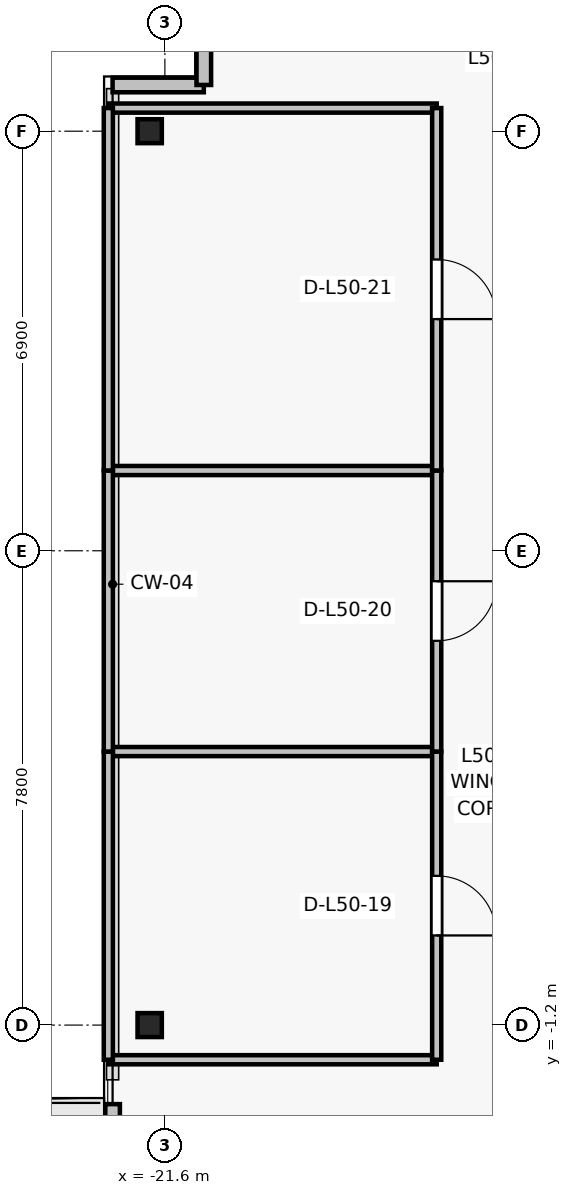
"""IFC4 building model, lengths in metres.
Left out: names, types, materials, properties, quantities, classifications, styles, units other than length and angle.
Written with IfcOpenShell. Run it as: python <this file> out.ifc"""

import sys

from ifc_helpers import new_model, si_unit, direction, frame, frame_2d, origin, origin_2d, place, context, subcontext, project, spatial, rectangle, i_section, extrude, source, transform, mapped, element, fill, save


model = new_model("IFC4")
c1 = context("Model", 3, precision=1e-05, world=origin(), true_north=direction((0.0, 1.0)))
c2 = subcontext(c1, "Body", "Model", "MODEL_VIEW")
j1 = project(units=[si_unit("LENGTHUNIT", "METRE"), si_unit("PLANEANGLEUNIT", "RADIAN")], contexts=[c1])
p1 = place(None, origin())
s1 = spatial("IfcSite", under=j1, at=p1, CompositionType="ELEMENT")
p2 = place(p1, origin())
s2 = spatial("IfcBuilding", under=s1, at=p2, CompositionType="ELEMENT")
p3 = place(p2, frame((0.0, 0.0, 179.2)))
s3 = spatial("IfcBuildingStorey", under=s2, at=p3, CompositionType="ELEMENT", Elevation=179.2)
for number, where, z_axis, x_axis in (
    (1, (-21.85, -1.2, 0.0), (0.0, 0.0, 1.0), (1.0, 0.0, 0.0)),
    (2, (-21.85, 13.5, 0.0), (0.0, 0.0, 1.0), (1.0, 0.0, 0.0)),
):
    element("IfcColumn", number, at=place(p3, frame(where, z_axis=z_axis, x_axis=x_axis)), inside=s3, PredefinedType="COLUMN", context=c2, shape_type="SweptSolid", body=[
        extrude(i_section(OverallWidth=0.399, OverallDepth=0.394, WebThickness=0.023, FlangeThickness=0.037, FilletRadius=0.015, at=origin_2d()), origin(), (0.0, 0.0, 1.0), 3.3),
    ])
p4 = place(p3, frame((-22.46, -8.3, 0.0), z_axis=(0.0, 0.0, 1.0), x_axis=(0.0, 1.0, 0.0)))
e3 = element("IfcWall", 3, at=p4, inside=s3, PredefinedType="SOLIDWALL", context=c2, shape_type="SweptSolid", body=[
    extrude(rectangle(XDim=5.8, YDim=0.24, at=frame_2d((2.9, 0.0))), origin(), (0.0, 0.0, 1.0), 3.075),
])
p5 = place(p4, frame((0.696, 0.0, 0.0)))
e4 = element("IfcOpeningElement", 4, at=p5, cuts=e3, PredefinedType="OPENING", context=c2, shape_type="SweptSolid", body=[
    extrude(rectangle(XDim=1.0, YDim=2.2, at=frame_2d((0.5, 1.1))), frame((0.0, 0.13, 0.0), z_axis=(0.0, -1.0, 0.0), x_axis=(1.0, 0.0, 0.0)), (0.0, 0.0, 1.0), 0.26),
])
p6 = place(p4, frame((2.046, 0.0, 0.85)))
e5 = element("IfcOpeningElement", 5, at=p6, cuts=e3, PredefinedType="OPENING", context=c2, shape_type="SweptSolid", body=[
    extrude(rectangle(XDim=0.9, YDim=1.35, at=frame_2d((0.45, 0.675))), frame((0.0, 0.13, 0.0), z_axis=(0.0, -1.0, 0.0), x_axis=(1.0, 0.0, 0.0)), (0.0, 0.0, 1.0), 0.26),
])
for number, where, z_axis, x_axis in (
    (6, (-20.96, 14.26, 0.0), (0.0, 0.0, 1.0), (-1.0, 0.0, 0.0)),
    (7, (-20.96, 15.76, 0.0), (0.0, 0.0, 1.0), (0.0, -1.0, 0.0)),
):
    element("IfcWall", number, at=place(p3, frame(where, z_axis=z_axis, x_axis=x_axis)), inside=s3, PredefinedType="SOLIDWALL", context=c2, shape_type="SweptSolid", body=[
        extrude(rectangle(XDim=1.5, YDim=0.24, at=frame_2d((0.75, 0.0))), origin(), (0.0, 0.0, 1.0), 3.075),
    ])
for number, where, z_axis, x_axis in (
    (8, (-17.13, -1.77, 0.0), (0.0, 0.0, 1.0), (-1.0, 0.0, 0.0)),
    (9, (-22.53, 3.298, 0.0), (0.0, 0.0, 1.0), (1.0, 0.0, 0.0)),
):
    element("IfcWall", number, at=place(p3, frame(where, z_axis=z_axis, x_axis=x_axis)), inside=s3, PredefinedType="PARTITIONING", context=c2, shape_type="SweptSolid", body=[
        extrude(rectangle(XDim=5.4, YDim=0.15, at=frame_2d((2.7, 0.0))), origin(), (0.0, 0.0, 1.0), 2.565),
    ])
p7 = place(p3, frame((-22.53, -1.77, 0.0), z_axis=(0.0, 0.0, 1.0), x_axis=(0.0, 1.0, 0.0)))
e10 = element("IfcWall", 10, at=p7, inside=s3, PredefinedType="PARTITIONING", context=c2, shape_type="SweptSolid", body=[
    extrude(rectangle(XDim=5.068, YDim=0.15, at=frame_2d((2.534, 0.0))), origin(), (0.0, 0.0, 1.0), 3.075),
])
p8 = place(p3, frame((-17.13, 3.298, 0.0), z_axis=(0.0, 0.0, 1.0), x_axis=(0.0, -1.0, 0.0)))
e11 = element("IfcWall", 11, at=p8, inside=s3, PredefinedType="PARTITIONING", context=c2, shape_type="SweptSolid", body=[
    extrude(rectangle(XDim=5.068, YDim=0.15, at=frame_2d((2.534, 0.0))), origin(), (0.0, 0.0, 1.0), 2.565),
])
p9 = place(p8, frame((2.044, 0.0, 0.0)))
e12 = element("IfcOpeningElement", 12, at=p9, cuts=e11, PredefinedType="OPENING", context=c2, shape_type="SweptSolid", body=[
    extrude(rectangle(XDim=0.98, YDim=2.15, at=frame_2d((0.49, 1.075))), frame((0.0, 0.085, 0.0), z_axis=(0.0, -1.0, 0.0), x_axis=(1.0, 0.0, 0.0)), (0.0, 0.0, 1.0), 0.17),
])
p10 = place(p3, frame((-22.53, 7.92, 0.0), z_axis=(0.0, 0.0, 1.0), x_axis=(1.0, 0.0, 0.0)))
e13 = element("IfcWall", 13, at=p10, inside=s3, PredefinedType="PARTITIONING", context=c2, shape_type="SweptSolid", body=[
    extrude(rectangle(XDim=5.4, YDim=0.15, at=frame_2d((2.7, 0.0))), origin(), (0.0, 0.0, 1.0), 2.565),
])
p11 = place(p3, frame((-22.53, 3.298, 0.0), z_axis=(0.0, 0.0, 1.0), x_axis=(0.0, 1.0, 0.0)))
e14 = element("IfcWall", 14, at=p11, inside=s3, PredefinedType="PARTITIONING", context=c2, shape_type="SweptSolid", body=[
    extrude(rectangle(XDim=4.622, YDim=0.15, at=frame_2d((2.311, 0.0))), origin(), (0.0, 0.0, 1.0), 3.075),
])
p12 = place(p3, frame((-17.13, 7.92, 0.0), z_axis=(0.0, 0.0, 1.0), x_axis=(0.0, -1.0, 0.0)))
e15 = element("IfcWall", 15, at=p12, inside=s3, PredefinedType="PARTITIONING", context=c2, shape_type="SweptSolid", body=[
    extrude(rectangle(XDim=4.622, YDim=0.15, at=frame_2d((2.311, 0.0))), origin(), (0.0, 0.0, 1.0), 3.075),
])
p13 = place(p12, frame((1.821, 0.0, 0.0)))
e16 = element("IfcOpeningElement", 16, at=p13, cuts=e15, PredefinedType="OPENING", context=c2, shape_type="SweptSolid", body=[
    extrude(rectangle(XDim=0.98, YDim=2.15, at=frame_2d((0.49, 1.075))), frame((0.0, 0.085, 0.0), z_axis=(0.0, -1.0, 0.0), x_axis=(1.0, 0.0, 0.0)), (0.0, 0.0, 1.0), 0.17),
])
p14 = place(p3, frame((-22.53, 13.88, 0.0), z_axis=(0.0, 0.0, 1.0), x_axis=(1.0, 0.0, 0.0)))
e17 = element("IfcWall", 17, at=p14, inside=s3, PredefinedType="PARTITIONING", context=c2, shape_type="SweptSolid", body=[
    extrude(rectangle(XDim=5.4, YDim=0.15, at=frame_2d((2.7, 0.0))), origin(), (0.0, 0.0, 1.0), 3.075),
])
p15 = place(p3, frame((-22.53, 7.92, 0.0), z_axis=(0.0, 0.0, 1.0), x_axis=(0.0, 1.0, 0.0)))
e18 = element("IfcWall", 18, at=p15, inside=s3, PredefinedType="PARTITIONING", context=c2, shape_type="SweptSolid", body=[
    extrude(rectangle(XDim=5.96, YDim=0.15, at=frame_2d((2.98, 0.0))), origin(), (0.0, 0.0, 1.0), 3.075),
])
p16 = place(p3, frame((-17.13, 13.88, 0.0), z_axis=(0.0, 0.0, 1.0), x_axis=(0.0, -1.0, 0.0)))
e19 = element("IfcWall", 19, at=p16, inside=s3, PredefinedType="PARTITIONING", context=c2, shape_type="SweptSolid", body=[
    extrude(rectangle(XDim=5.96, YDim=0.15, at=frame_2d((2.98, 0.0))), origin(), (0.0, 0.0, 1.0), 2.565),
])
p17 = place(p16, frame((2.49, 0.0, 0.0)))
e20 = element("IfcOpeningElement", 20, at=p17, cuts=e19, PredefinedType="OPENING", context=c2, shape_type="SweptSolid", body=[
    extrude(rectangle(XDim=0.98, YDim=2.15, at=frame_2d((0.49, 1.075))), frame((0.0, 0.085, 0.0), z_axis=(0.0, -1.0, 0.0), x_axis=(1.0, 0.0, 0.0)), (0.0, 0.0, 1.0), 0.17),
])
m1 = source(origin(), c2, "Body", "SweptSolid", [
    extrude(rectangle(XDim=0.98, YDim=2.15, at=frame_2d((0.49, 1.075))), frame((0.0, 0.025, 0.0), z_axis=(0.0, -1.0, 0.0), x_axis=(1.0, 0.0, 0.0)), (0.0, 0.0, 1.0), 0.05),
])
p18 = place(p9, origin())
e21 = element("IfcDoor", 21, at=p18, inside=s3, OperationType="SINGLE_SWING_RIGHT", PredefinedType="DOOR", context=c2, shape_type="MappedRepresentation", body=[
    mapped(m1, transform((0.0, 0.0, 0.0), x_axis=(1.0, 0.0, 0.0), y_axis=(0.0, 1.0, 0.0), z_axis=(0.0, 0.0, 1.0), scale=1.0)),
])
fill(e12, e21)
p19 = place(p13, origin())
e22 = element("IfcDoor", 22, at=p19, inside=s3, OperationType="SINGLE_SWING_LEFT", PredefinedType="DOOR", context=c2, shape_type="MappedRepresentation", body=[
    mapped(m1, transform((0.0, 0.0, 0.0), x_axis=(1.0, 0.0, 0.0), y_axis=(0.0, 1.0, 0.0), z_axis=(0.0, 0.0, 1.0), scale=1.0)),
])
fill(e16, e22)
p20 = place(p17, origin())
e23 = element("IfcDoor", 23, at=p20, inside=s3, OperationType="SINGLE_SWING_RIGHT", PredefinedType="DOOR", context=c2, shape_type="MappedRepresentation", body=[
    mapped(m1, transform((0.0, 0.0, 0.0), x_axis=(1.0, 0.0, 0.0), y_axis=(0.0, 1.0, 0.0), z_axis=(0.0, 0.0, 1.0), scale=1.0)),
])
fill(e20, e23)
save(model, sys.argv[1])
